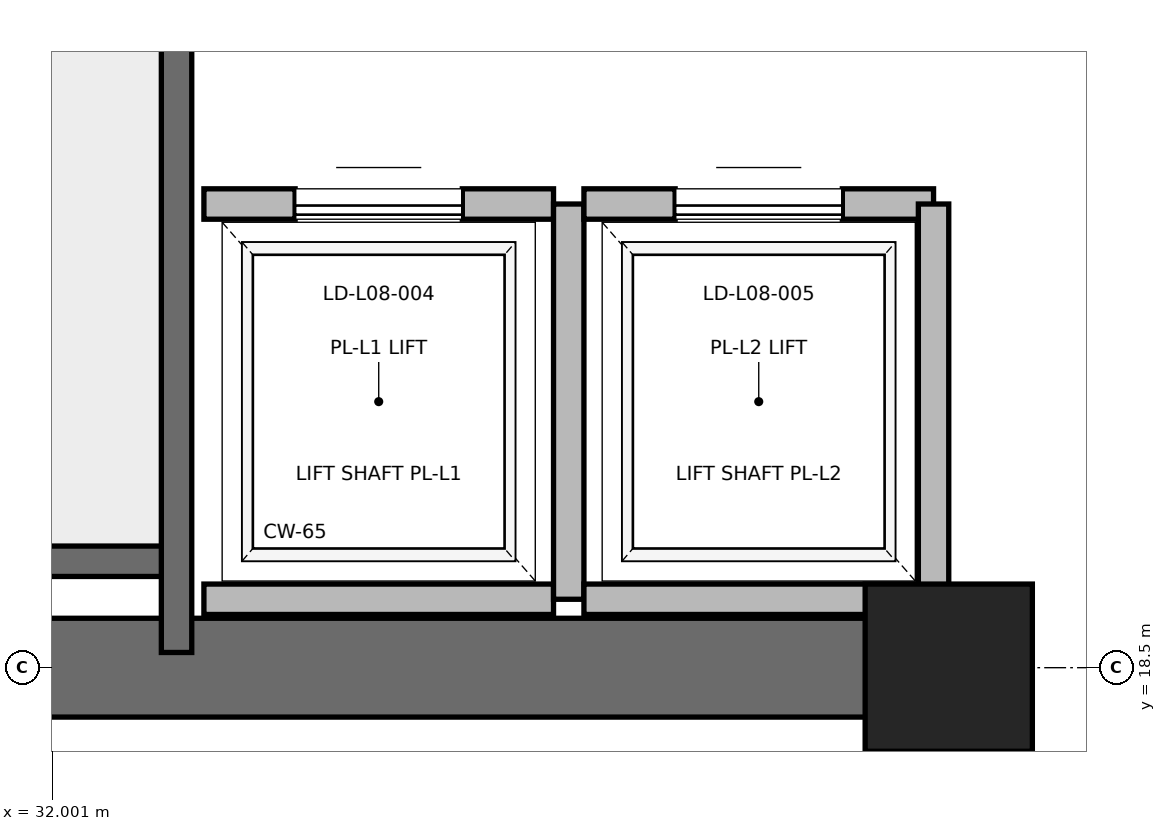
"""IFC4 building model, lengths in metres.
Left out: names, types, materials, properties, quantities, classifications, styles, units other than length and angle.
Written with IfcOpenShell. Run it as: python <this file> out.ifc"""

import sys

from ifc_helpers import new_model, si_unit, direction, frame, frame_2d, origin, origin_2d, place, context, subcontext, project, spatial, rectangle, extrude, element, fill, save


model = new_model("IFC4")
c1 = context("Model", 3, precision=1e-05, world=origin(), true_north=direction((0.0, 1.0)))
c2 = subcontext(c1, "Body", "Model", "MODEL_VIEW")
j1 = project(units=[si_unit("LENGTHUNIT", "METRE"), si_unit("PLANEANGLEUNIT", "RADIAN")], contexts=[c1])
p1 = place(None, origin())
s1 = spatial("IfcSite", under=j1, at=p1, CompositionType="ELEMENT")
p2 = place(p1, origin())
s2 = spatial("IfcBuilding", under=s1, at=p2, CompositionType="ELEMENT")
p3 = place(p2, frame((0.0, 0.0, 39.6)))
s3 = spatial("IfcBuildingStorey", under=s2, at=p3, CompositionType="ELEMENT", Elevation=39.6)
p4 = place(p3, frame((37.9, 18.5, 0.0), z_axis=(0.0, 0.0, 1.0), x_axis=(1.0, 0.0, 0.0)))
e1 = element("IfcColumn", 1, at=p4, inside=s3, PredefinedType="PILASTER", context=c2, shape_type="SweptSolid", body=[
    extrude(rectangle(XDim=1.1, YDim=1.1, at=origin_2d()), origin(), (0.0, 0.0, 1.0), 4.0),
])
p5 = place(p3, frame((29.0, 18.5, 0.0), z_axis=(0.0, 0.0, 1.0), x_axis=(1.0, 0.0, 0.0)))
e2 = element("IfcWall", 2, at=p5, inside=s3, PredefinedType="SHEAR", context=c2, shape_type="SweptSolid", body=[
    extrude(rectangle(XDim=9.2, YDim=0.65, at=frame_2d((4.6, 0.0))), origin(), (0.0, 0.0, 1.0), 3.76),
])
p6 = place(p3, frame((29.7, 19.2, 0.0), z_axis=(0.0, 0.0, 1.0), x_axis=(1.0, 0.0, 0.0)))
e3 = element("IfcWall", 3, at=p6, inside=s3, PredefinedType="SOLIDWALL", context=c2, shape_type="SweptSolid", body=[
    extrude(rectangle(XDim=3.12, YDim=0.2, at=frame_2d((1.56, 0.0))), origin(), (0.0, 0.0, 1.0), 3.76),
])
p7 = place(p3, frame((32.82, 18.6, 0.0), z_axis=(0.0, 0.0, 1.0), x_axis=(0.0, 1.0, 0.0)))
e4 = element("IfcWall", 4, at=p7, inside=s3, PredefinedType="SOLIDWALL", context=c2, shape_type="SweptSolid", body=[
    extrude(rectangle(XDim=8.78, YDim=0.2, at=frame_2d((4.39, 0.0))), origin(), (0.0, 0.0, 1.0), 3.76),
])
p8 = place(p3, frame((33.0, 18.95, 0.0), z_axis=(0.0, 0.0, 1.0), x_axis=(1.0, 0.0, 0.0)))
e5 = element("IfcWall", 5, at=p8, inside=s3, PredefinedType="SOLIDWALL", context=c2, shape_type="SweptSolid", body=[
    extrude(rectangle(XDim=2.3, YDim=0.2, at=frame_2d((1.15, 0.0))), origin(), (0.0, 0.0, 1.0), 3.76),
])
p9 = place(p3, frame((35.3, 21.55, 0.0), z_axis=(0.0, 0.0, 1.0), x_axis=(-1.0, 0.0, 0.0)))
e6 = element("IfcWall", 6, at=p9, inside=s3, PredefinedType="SOLIDWALL", context=c2, shape_type="SweptSolid", body=[
    extrude(rectangle(XDim=2.3, YDim=0.2, at=frame_2d((1.15, 0.0))), origin(), (0.0, 0.0, 1.0), 3.76),
])
p10 = place(p9, frame((0.6, 0.0, 0.0)))
e7 = element("IfcOpeningElement", 7, at=p10, cuts=e6, PredefinedType="OPENING", context=c2, shape_type="SweptSolid", body=[
    extrude(rectangle(XDim=1.1, YDim=2.2, at=frame_2d((0.55, 1.1))), frame((0.0, 0.1, 0.0), z_axis=(0.0, -1.0, 0.0), x_axis=(1.0, 0.0, 0.0)), (0.0, 0.0, 1.0), 0.2),
])
p11 = place(p3, frame((35.4, 18.95, 0.0), z_axis=(0.0, 0.0, 1.0), x_axis=(0.0, 1.0, 0.0)))
e8 = element("IfcWall", 8, at=p11, inside=s3, PredefinedType="SOLIDWALL", context=c2, shape_type="SweptSolid", body=[
    extrude(rectangle(XDim=2.6, YDim=0.2, at=frame_2d((1.3, 0.0))), origin(), (0.0, 0.0, 1.0), 3.76),
])
p12 = place(p3, frame((35.5, 18.95, 0.0), z_axis=(0.0, 0.0, 1.0), x_axis=(1.0, 0.0, 0.0)))
e9 = element("IfcWall", 9, at=p12, inside=s3, PredefinedType="SOLIDWALL", context=c2, shape_type="SweptSolid", body=[
    extrude(rectangle(XDim=2.3, YDim=0.2, at=frame_2d((1.15, 0.0))), origin(), (0.0, 0.0, 1.0), 2.54),
])
p13 = place(p3, frame((37.8, 21.55, 0.0), z_axis=(0.0, 0.0, 1.0), x_axis=(-1.0, 0.0, 0.0)))
e10 = element("IfcWall", 10, at=p13, inside=s3, PredefinedType="SOLIDWALL", context=c2, shape_type="SweptSolid", body=[
    extrude(rectangle(XDim=2.3, YDim=0.2, at=frame_2d((1.15, 0.0))), origin(), (0.0, 0.0, 1.0), 3.76),
])
p14 = place(p13, frame((0.6, 0.0, 0.0)))
e11 = element("IfcOpeningElement", 11, at=p14, cuts=e10, PredefinedType="OPENING", context=c2, shape_type="SweptSolid", body=[
    extrude(rectangle(XDim=1.1, YDim=2.2, at=frame_2d((0.55, 1.1))), frame((0.0, 0.1, 0.0), z_axis=(0.0, -1.0, 0.0), x_axis=(1.0, 0.0, 0.0)), (0.0, 0.0, 1.0), 0.2),
])
p15 = place(p3, frame((37.8, 18.95, 0.0), z_axis=(0.0, 0.0, 1.0), x_axis=(0.0, 1.0, 0.0)))
e12 = element("IfcWall", 12, at=p15, inside=s3, PredefinedType="SOLIDWALL", context=c2, shape_type="SweptSolid", body=[
    extrude(rectangle(XDim=2.6, YDim=0.2, at=frame_2d((1.3, 0.0))), origin(), (0.0, 0.0, 1.0), 2.54),
])
p16 = place(p10, origin())
e13 = element("IfcDoor", 13, at=p16, inside=s3, OperationType="SLIDING_TO_RIGHT", PredefinedType="DOOR", context=c2, shape_type="SweptSolid", body=[
    extrude(rectangle(XDim=1.1, YDim=2.2, at=frame_2d((0.55, 1.1))), frame((0.0, 0.025, 0.0), z_axis=(0.0, -1.0, 0.0), x_axis=(1.0, 0.0, 0.0)), (0.0, 0.0, 1.0), 0.05),
])
fill(e7, e13)
p17 = place(p14, origin())
e14 = element("IfcDoor", 14, at=p17, inside=s3, OperationType="SLIDING_TO_RIGHT", PredefinedType="DOOR", context=c2, shape_type="SweptSolid", body=[
    extrude(rectangle(XDim=1.1, YDim=2.2, at=frame_2d((0.55, 1.1))), frame((0.0, 0.025, 0.0), z_axis=(0.0, -1.0, 0.0), x_axis=(1.0, 0.0, 0.0)), (0.0, 0.0, 1.0), 0.05),
])
fill(e11, e14)
save(model, sys.argv[1])
